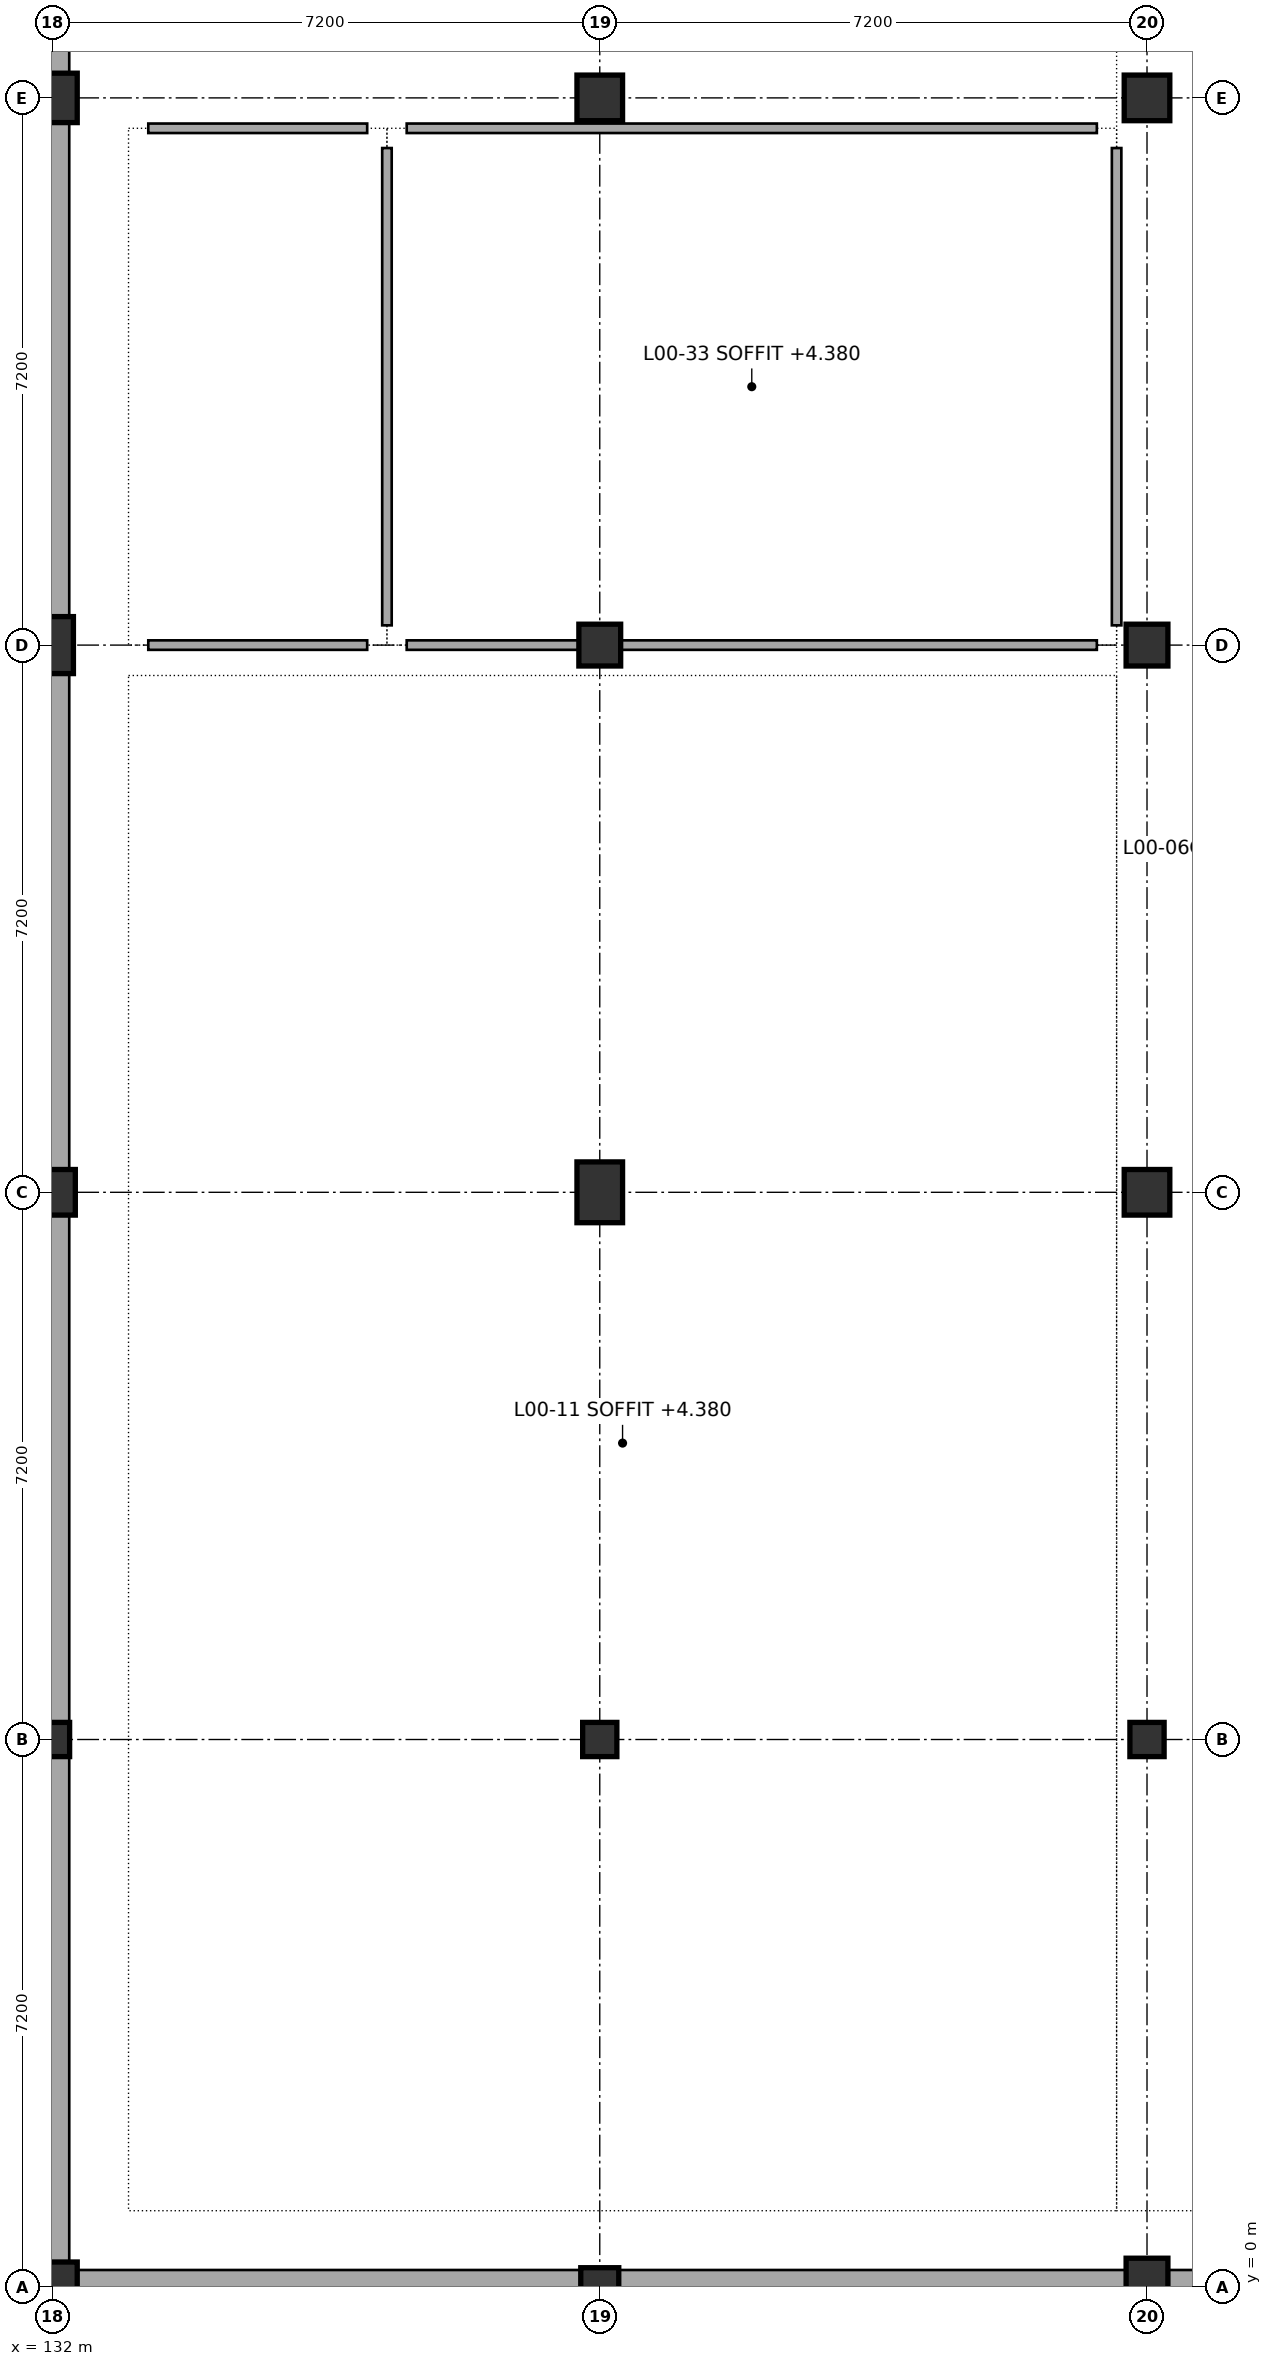
"""IFC4 building model, lengths in metres.
Left out: names, types, materials, properties, quantities, classifications, styles, units other than length and angle.
Written with IfcOpenShell. Run it as: python <this file> out.ifc"""

import sys

from ifc_helpers import new_model, si_unit, direction, frame, frame_2d, origin, origin_2d, place, context, subcontext, project, spatial, rectangle, circle, extrude, element, fill, save


model = new_model("IFC4")
c1 = context("Model", 3, precision=1e-05, world=origin(), true_north=direction((0.0, 1.0)))
c2 = subcontext(c1, "Body", "Model", "MODEL_VIEW")
j1 = project(units=[si_unit("LENGTHUNIT", "METRE"), si_unit("PLANEANGLEUNIT", "RADIAN")], contexts=[c1])
p1 = place(None, origin())
s1 = spatial("IfcSite", under=j1, at=p1, CompositionType="ELEMENT")
p2 = place(p1, origin())
s2 = spatial("IfcBuilding", under=s1, at=p2, CompositionType="ELEMENT")
p3 = place(p2, origin())
s3 = spatial("IfcBuildingStorey", under=s2, at=p3, CompositionType="ELEMENT", Elevation=0.0)
p4 = place(p3, frame((132.0, 0.0, 0.0), z_axis=(0.0, 0.0, 1.0), x_axis=(1.0, 0.0, 0.0)))
e1 = element("IfcColumn", 1, at=p4, inside=s3, PredefinedType="COLUMN", context=c2, shape_type="SweptSolid", body=[
    extrude(circle(Radius=0.325, at=origin_2d()), origin(), (0.0, 0.0, 1.0), 4.8),
])
p5 = place(p3, frame((132.0, 7.2, 0.0), z_axis=(0.0, 0.0, 1.0), x_axis=(1.0, 0.0, 0.0)))
e2 = element("IfcColumn", 2, at=p5, inside=s3, PredefinedType="COLUMN", context=c2, shape_type="SweptSolid", body=[
    extrude(rectangle(XDim=0.45, YDim=0.45, at=origin_2d()), origin(), (0.0, 0.0, 1.0), 4.8),
])
p6 = place(p3, frame((132.0, 14.4, 0.0), z_axis=(0.0, 0.0, 1.0), x_axis=(1.0, 0.0, 0.0)))
e3 = element("IfcColumn", 3, at=p6, inside=s3, PredefinedType="COLUMN", context=c2, shape_type="SweptSolid", body=[
    extrude(rectangle(XDim=0.6, YDim=0.6, at=origin_2d()), origin(), (0.0, 0.0, 1.0), 4.8),
])
p7 = place(p3, frame((132.0, 21.6, 0.0), z_axis=(0.0, 0.0, 1.0), x_axis=(1.0, 0.0, 0.0)))
e4 = element("IfcColumn", 4, at=p7, inside=s3, PredefinedType="COLUMN", context=c2, shape_type="SweptSolid", body=[
    extrude(rectangle(XDim=0.55, YDim=0.75, at=origin_2d()), origin(), (0.0, 0.0, 1.0), 4.8),
])
p8 = place(p3, frame((132.0, 28.8, 0.0), z_axis=(0.0, 0.0, 1.0), x_axis=(1.0, 0.0, 0.0)))
e5 = element("IfcColumn", 5, at=p8, inside=s3, PredefinedType="COLUMN", context=c2, shape_type="SweptSolid", body=[
    extrude(circle(Radius=0.325, at=origin_2d()), origin(), (0.0, 0.0, 1.0), 4.8),
])
p9 = place(p3, frame((139.2, 0.0, 0.0), z_axis=(0.0, 0.0, 1.0), x_axis=(1.0, 0.0, 0.0)))
e6 = element("IfcColumn", 6, at=p9, inside=s3, PredefinedType="COLUMN", context=c2, shape_type="SweptSolid", body=[
    extrude(rectangle(XDim=0.5, YDim=0.5, at=origin_2d()), origin(), (0.0, 0.0, 1.0), 4.8),
])
p10 = place(p3, frame((139.2, 7.2, 0.0), z_axis=(0.0, 0.0, 1.0), x_axis=(1.0, 0.0, 0.0)))
e7 = element("IfcColumn", 7, at=p10, inside=s3, PredefinedType="COLUMN", context=c2, shape_type="SweptSolid", body=[
    extrude(rectangle(XDim=0.45, YDim=0.45, at=origin_2d()), origin(), (0.0, 0.0, 1.0), 4.8),
])
p11 = place(p3, frame((139.2, 14.4, 0.0), z_axis=(0.0, 0.0, 1.0), x_axis=(1.0, 0.0, 0.0)))
e8 = element("IfcColumn", 8, at=p11, inside=s3, PredefinedType="COLUMN", context=c2, shape_type="SweptSolid", body=[
    extrude(rectangle(XDim=0.6, YDim=0.8, at=origin_2d()), origin(), (0.0, 0.0, 1.0), 4.8),
])
p12 = place(p3, frame((139.2, 21.6, 0.0), z_axis=(0.0, 0.0, 1.0), x_axis=(1.0, 0.0, 0.0)))
e9 = element("IfcColumn", 9, at=p12, inside=s3, PredefinedType="COLUMN", context=c2, shape_type="SweptSolid", body=[
    extrude(rectangle(XDim=0.55, YDim=0.55, at=origin_2d()), origin(), (0.0, 0.0, 1.0), 4.8),
])
p13 = place(p3, frame((139.2, 28.8, 0.0), z_axis=(0.0, 0.0, 1.0), x_axis=(1.0, 0.0, 0.0)))
e10 = element("IfcColumn", 10, at=p13, inside=s3, PredefinedType="COLUMN", context=c2, shape_type="SweptSolid", body=[
    extrude(rectangle(XDim=0.6, YDim=0.6, at=origin_2d()), origin(), (0.0, 0.0, 1.0), 4.8),
])
p14 = place(p3, frame((146.4, 0.0, 0.0), z_axis=(0.0, 0.0, 1.0), x_axis=(1.0, 0.0, 0.0)))
e11 = element("IfcColumn", 11, at=p14, inside=s3, PredefinedType="COLUMN", context=c2, shape_type="SweptSolid", body=[
    extrude(rectangle(XDim=0.55, YDim=0.75, at=origin_2d()), origin(), (0.0, 0.0, 1.0), 4.8),
])
p15 = place(p3, frame((146.4, 7.2, 0.0), z_axis=(0.0, 0.0, 1.0), x_axis=(1.0, 0.0, 0.0)))
e12 = element("IfcColumn", 12, at=p15, inside=s3, PredefinedType="COLUMN", context=c2, shape_type="SweptSolid", body=[
    extrude(rectangle(XDim=0.45, YDim=0.45, at=origin_2d()), origin(), (0.0, 0.0, 1.0), 4.8),
])
p16 = place(p3, frame((146.4, 14.4, 0.0), z_axis=(0.0, 0.0, 1.0), x_axis=(1.0, 0.0, 0.0)))
e13 = element("IfcColumn", 13, at=p16, inside=s3, PredefinedType="COLUMN", context=c2, shape_type="SweptSolid", body=[
    extrude(rectangle(XDim=0.6, YDim=0.6, at=origin_2d()), origin(), (0.0, 0.0, 1.0), 4.8),
])
p17 = place(p3, frame((146.4, 21.6, 0.0), z_axis=(0.0, 0.0, 1.0), x_axis=(1.0, 0.0, 0.0)))
e14 = element("IfcColumn", 14, at=p17, inside=s3, PredefinedType="COLUMN", context=c2, shape_type="SweptSolid", body=[
    extrude(rectangle(XDim=0.55, YDim=0.55, at=origin_2d()), origin(), (0.0, 0.0, 1.0), 4.8),
])
p18 = place(p3, frame((146.4, 28.8, 0.0), z_axis=(0.0, 0.0, 1.0), x_axis=(1.0, 0.0, 0.0)))
e15 = element("IfcColumn", 15, at=p18, inside=s3, PredefinedType="COLUMN", context=c2, shape_type="SweptSolid", body=[
    extrude(rectangle(XDim=0.6, YDim=0.6, at=origin_2d()), origin(), (0.0, 0.0, 1.0), 4.8),
])
p19 = place(p3, frame((153.6, 0.0, 0.0), z_axis=(0.0, 0.0, 1.0), x_axis=(-1.0, 0.0, 0.0)))
e16 = element("IfcWall", 16, at=p19, inside=s3, PredefinedType="STANDARD", context=c2, shape_type="SweptSolid", body=[
    extrude(rectangle(XDim=7.2, YDim=0.44, at=frame_2d((3.6, 0.0))), origin(), (0.0, 0.0, 1.0), 4.44),
])
p20 = place(p19, frame((2.7, 0.0, 0.8)))
e17 = element("IfcOpeningElement", 17, at=p20, cuts=e16, PredefinedType="OPENING", context=c2, shape_type="SweptSolid", body=[
    extrude(rectangle(XDim=1.8, YDim=1.65, at=frame_2d((0.9, 0.825))), frame((0.0, 0.23, 0.0), z_axis=(0.0, -1.0, 0.0), x_axis=(1.0, 0.0, 0.0)), (0.0, 0.0, 1.0), 0.46),
])
p21 = place(p3, frame((146.4, 0.0, 0.0), z_axis=(0.0, 0.0, 1.0), x_axis=(-1.0, 0.0, 0.0)))
e18 = element("IfcWall", 18, at=p21, inside=s3, PredefinedType="STANDARD", context=c2, shape_type="SweptSolid", body=[
    extrude(rectangle(XDim=7.2, YDim=0.44, at=frame_2d((3.6, 0.0))), origin(), (0.0, 0.0, 1.0), 4.44),
])
p22 = place(p21, frame((2.9, 0.0, 0.8)))
e19 = element("IfcOpeningElement", 19, at=p22, cuts=e18, PredefinedType="OPENING", context=c2, shape_type="SweptSolid", body=[
    extrude(rectangle(XDim=1.4, YDim=2.05, at=frame_2d((0.7, 1.025))), frame((0.0, 0.23, 0.0), z_axis=(0.0, -1.0, 0.0), x_axis=(1.0, 0.0, 0.0)), (0.0, 0.0, 1.0), 0.46),
])
p23 = place(p3, frame((139.2, 0.0, 0.0), z_axis=(0.0, 0.0, 1.0), x_axis=(-1.0, 0.0, 0.0)))
e20 = element("IfcWall", 20, at=p23, inside=s3, PredefinedType="STANDARD", context=c2, shape_type="SweptSolid", body=[
    extrude(rectangle(XDim=7.2, YDim=0.44, at=frame_2d((3.6, 0.0))), origin(), (0.0, 0.0, 1.0), 4.44),
])
p24 = place(p23, frame((2.7, 0.0, 0.8)))
e21 = element("IfcOpeningElement", 21, at=p24, cuts=e20, PredefinedType="OPENING", context=c2, shape_type="SweptSolid", body=[
    extrude(rectangle(XDim=1.8, YDim=2.05, at=frame_2d((0.9, 1.025))), frame((0.0, 0.23, 0.0), z_axis=(0.0, -1.0, 0.0), x_axis=(1.0, 0.0, 0.0)), (0.0, 0.0, 1.0), 0.46),
])
p25 = place(p3, frame((132.0, 0.0, 0.0), z_axis=(0.0, 0.0, 1.0), x_axis=(0.0, 1.0, 0.0)))
e22 = element("IfcWall", 22, at=p25, inside=s3, PredefinedType="STANDARD", context=c2, shape_type="SweptSolid", body=[
    extrude(rectangle(XDim=7.2, YDim=0.44, at=frame_2d((3.6, 0.0))), origin(), (0.0, 0.0, 1.0), 4.44),
])
p26 = place(p25, frame((2.5, 0.0, 0.8)))
e23 = element("IfcOpeningElement", 23, at=p26, cuts=e22, PredefinedType="OPENING", context=c2, shape_type="SweptSolid", body=[
    extrude(rectangle(XDim=2.2, YDim=2.05, at=frame_2d((1.1, 1.025))), frame((0.0, 0.23, 0.0), z_axis=(0.0, -1.0, 0.0), x_axis=(1.0, 0.0, 0.0)), (0.0, 0.0, 1.0), 0.46),
])
p27 = place(p3, frame((132.0, 7.2, 0.0), z_axis=(0.0, 0.0, 1.0), x_axis=(0.0, 1.0, 0.0)))
e24 = element("IfcWall", 24, at=p27, inside=s3, PredefinedType="STANDARD", context=c2, shape_type="SweptSolid", body=[
    extrude(rectangle(XDim=7.2, YDim=0.44, at=frame_2d((3.6, 0.0))), origin(), (0.0, 0.0, 1.0), 4.44),
])
p28 = place(p27, frame((3.0, 0.0, 0.8)))
e25 = element("IfcOpeningElement", 25, at=p28, cuts=e24, PredefinedType="OPENING", context=c2, shape_type="SweptSolid", body=[
    extrude(rectangle(XDim=1.2, YDim=1.65, at=frame_2d((0.6, 0.825))), frame((0.0, 0.23, 0.0), z_axis=(0.0, -1.0, 0.0), x_axis=(1.0, 0.0, 0.0)), (0.0, 0.0, 1.0), 0.46),
])
p29 = place(p3, frame((132.0, 14.4, 0.0), z_axis=(0.0, 0.0, 1.0), x_axis=(0.0, 1.0, 0.0)))
e26 = element("IfcWall", 26, at=p29, inside=s3, PredefinedType="STANDARD", context=c2, shape_type="SweptSolid", body=[
    extrude(rectangle(XDim=7.2, YDim=0.44, at=frame_2d((3.6, 0.0))), origin(), (0.0, 0.0, 1.0), 4.44),
])
p30 = place(p29, frame((2.85, 0.0, 0.8)))
e27 = element("IfcOpeningElement", 27, at=p30, cuts=e26, PredefinedType="OPENING", context=c2, shape_type="SweptSolid", body=[
    extrude(rectangle(XDim=1.5, YDim=1.65, at=frame_2d((0.75, 0.825))), frame((0.0, 0.23, 0.0), z_axis=(0.0, -1.0, 0.0), x_axis=(1.0, 0.0, 0.0)), (0.0, 0.0, 1.0), 0.46),
])
p31 = place(p3, frame((132.0, 21.6, 0.0), z_axis=(0.0, 0.0, 1.0), x_axis=(0.0, 1.0, 0.0)))
e28 = element("IfcWall", 28, at=p31, inside=s3, PredefinedType="STANDARD", context=c2, shape_type="SweptSolid", body=[
    extrude(rectangle(XDim=7.2, YDim=0.44, at=frame_2d((3.6, 0.0))), origin(), (0.0, 0.0, 1.0), 4.44),
])
p32 = place(p31, frame((2.7, 0.0, 0.8)))
e29 = element("IfcOpeningElement", 29, at=p32, cuts=e28, PredefinedType="OPENING", context=c2, shape_type="SweptSolid", body=[
    extrude(rectangle(XDim=1.8, YDim=1.65, at=frame_2d((0.9, 0.825))), frame((0.0, 0.23, 0.0), z_axis=(0.0, -1.0, 0.0), x_axis=(1.0, 0.0, 0.0)), (0.0, 0.0, 1.0), 0.46),
])
p33 = place(p3, frame((132.0, 28.8, 0.0), z_axis=(0.0, 0.0, 1.0), x_axis=(0.0, 1.0, 0.0)))
e30 = element("IfcWall", 30, at=p33, inside=s3, PredefinedType="STANDARD", context=c2, shape_type="SweptSolid", body=[
    extrude(rectangle(XDim=7.2, YDim=0.44, at=frame_2d((3.6, 0.0))), origin(), (0.0, 0.0, 1.0), 4.44),
])
p34 = place(p33, frame((2.9, 0.0, 0.8)))
e31 = element("IfcOpeningElement", 31, at=p34, cuts=e30, PredefinedType="OPENING", context=c2, shape_type="SweptSolid", body=[
    extrude(rectangle(XDim=1.4, YDim=2.05, at=frame_2d((0.7, 1.025))), frame((0.0, 0.23, 0.0), z_axis=(0.0, -1.0, 0.0), x_axis=(1.0, 0.0, 0.0)), (0.0, 0.0, 1.0), 0.46),
])
p35 = place(p3, frame((136.66, 21.6, 0.0), z_axis=(0.0, 0.0, 1.0), x_axis=(1.0, 0.0, 0.0)))
e32 = element("IfcWall", 32, at=p35, inside=s3, PredefinedType="PARTITIONING", context=c2, shape_type="SweptSolid", body=[
    extrude(rectangle(XDim=9.08, YDim=0.125, at=frame_2d((4.54, 0.0))), origin(), (0.0, 0.0, 1.0), 3.665),
])
p36 = place(p3, frame((146.0, 21.86, 0.0), z_axis=(0.0, 0.0, 1.0), x_axis=(0.0, 1.0, 0.0)))
e33 = element("IfcWall", 33, at=p36, inside=s3, PredefinedType="PARTITIONING", context=c2, shape_type="SweptSolid", body=[
    extrude(rectangle(XDim=6.28, YDim=0.125, at=frame_2d((3.14, 0.0))), origin(), (0.0, 0.0, 1.0), 3.615),
])
p37 = place(p36, frame((2.67, 0.0, 0.0)))
e34 = element("IfcOpeningElement", 34, at=p37, cuts=e33, PredefinedType="OPENING", context=c2, shape_type="SweptSolid", body=[
    extrude(rectangle(XDim=0.94, YDim=2.1, at=frame_2d((0.47, 1.05))), frame((0.0, 0.073, 0.0), z_axis=(0.0, -1.0, 0.0), x_axis=(1.0, 0.0, 0.0)), (0.0, 0.0, 1.0), 0.145),
])
p38 = place(p3, frame((145.74, 28.4, 0.0), z_axis=(0.0, 0.0, 1.0), x_axis=(-1.0, 0.0, 0.0)))
e35 = element("IfcWall", 35, at=p38, inside=s3, PredefinedType="PARTITIONING", context=c2, shape_type="SweptSolid", body=[
    extrude(rectangle(XDim=9.08, YDim=0.125, at=frame_2d((4.54, 0.0))), origin(), (0.0, 0.0, 1.0), 3.665),
])
p39 = place(p3, frame((136.4, 28.14, 0.0), z_axis=(0.0, 0.0, 1.0), x_axis=(0.0, -1.0, 0.0)))
e36 = element("IfcWall", 36, at=p39, inside=s3, PredefinedType="PARTITIONING", context=c2, shape_type="SweptSolid", body=[
    extrude(rectangle(XDim=6.28, YDim=0.125, at=frame_2d((3.14, 0.0))), origin(), (0.0, 0.0, 1.0), 4.44),
])
p40 = place(p3, frame((133.26, 21.6, 0.0), z_axis=(0.0, 0.0, 1.0), x_axis=(1.0, 0.0, 0.0)))
e37 = element("IfcWall", 37, at=p40, inside=s3, PredefinedType="PARTITIONING", context=c2, shape_type="SweptSolid", body=[
    extrude(rectangle(XDim=2.88, YDim=0.125, at=frame_2d((1.44, 0.0))), origin(), (0.0, 0.0, 1.0), 3.715),
])
p41 = place(p3, frame((136.14, 28.4, 0.0), z_axis=(0.0, 0.0, 1.0), x_axis=(-1.0, 0.0, 0.0)))
e38 = element("IfcWall", 38, at=p41, inside=s3, PredefinedType="PARTITIONING", context=c2, shape_type="SweptSolid", body=[
    extrude(rectangle(XDim=2.88, YDim=0.125, at=frame_2d((1.44, 0.0))), origin(), (0.0, 0.0, 1.0), 3.665),
])
p42 = place(p41, frame((0.97, 0.0, 0.0)))
e39 = element("IfcOpeningElement", 39, at=p42, cuts=e38, PredefinedType="OPENING", context=c2, shape_type="SweptSolid", body=[
    extrude(rectangle(XDim=0.94, YDim=2.1, at=frame_2d((0.47, 1.05))), frame((0.0, 0.073, 0.0), z_axis=(0.0, -1.0, 0.0), x_axis=(1.0, 0.0, 0.0)), (0.0, 0.0, 1.0), 0.145),
])
p43 = place(p22, origin())
e40 = element("IfcWindow", 40, at=p43, inside=s3, PartitioningType="SINGLE_PANEL", PredefinedType="WINDOW", context=c2, shape_type="SweptSolid", body=[
    extrude(rectangle(XDim=1.4, YDim=2.05, at=frame_2d((0.7, 1.025))), frame((0.0, 0.03, 0.0), z_axis=(0.0, -1.0, 0.0), x_axis=(1.0, 0.0, 0.0)), (0.0, 0.0, 1.0), 0.06),
])
fill(e19, e40)
p44 = place(p24, origin())
e41 = element("IfcWindow", 41, at=p44, inside=s3, PartitioningType="SINGLE_PANEL", PredefinedType="WINDOW", context=c2, shape_type="SweptSolid", body=[
    extrude(rectangle(XDim=1.8, YDim=2.05, at=frame_2d((0.9, 1.025))), frame((0.0, 0.03, 0.0), z_axis=(0.0, -1.0, 0.0), x_axis=(1.0, 0.0, 0.0)), (0.0, 0.0, 1.0), 0.06),
])
fill(e21, e41)
p45 = place(p26, origin())
e42 = element("IfcWindow", 42, at=p45, inside=s3, PartitioningType="SINGLE_PANEL", PredefinedType="WINDOW", context=c2, shape_type="SweptSolid", body=[
    extrude(rectangle(XDim=2.2, YDim=2.05, at=frame_2d((1.1, 1.025))), frame((0.0, 0.03, 0.0), z_axis=(0.0, -1.0, 0.0), x_axis=(1.0, 0.0, 0.0)), (0.0, 0.0, 1.0), 0.06),
])
fill(e23, e42)
p46 = place(p28, origin())
e43 = element("IfcWindow", 43, at=p46, inside=s3, PartitioningType="SINGLE_PANEL", PredefinedType="WINDOW", context=c2, shape_type="SweptSolid", body=[
    extrude(rectangle(XDim=1.2, YDim=1.65, at=frame_2d((0.6, 0.825))), frame((0.0, 0.03, 0.0), z_axis=(0.0, -1.0, 0.0), x_axis=(1.0, 0.0, 0.0)), (0.0, 0.0, 1.0), 0.06),
])
fill(e25, e43)
p47 = place(p30, origin())
e44 = element("IfcWindow", 44, at=p47, inside=s3, PartitioningType="SINGLE_PANEL", PredefinedType="WINDOW", context=c2, shape_type="SweptSolid", body=[
    extrude(rectangle(XDim=1.5, YDim=1.65, at=frame_2d((0.75, 0.825))), frame((0.0, 0.03, 0.0), z_axis=(0.0, -1.0, 0.0), x_axis=(1.0, 0.0, 0.0)), (0.0, 0.0, 1.0), 0.06),
])
fill(e27, e44)
p48 = place(p32, origin())
e45 = element("IfcWindow", 45, at=p48, inside=s3, PartitioningType="SINGLE_PANEL", PredefinedType="WINDOW", context=c2, shape_type="SweptSolid", body=[
    extrude(rectangle(XDim=1.8, YDim=1.65, at=frame_2d((0.9, 0.825))), frame((0.0, 0.03, 0.0), z_axis=(0.0, -1.0, 0.0), x_axis=(1.0, 0.0, 0.0)), (0.0, 0.0, 1.0), 0.06),
])
fill(e29, e45)
p49 = place(p37, origin())
e46 = element("IfcDoor", 46, at=p49, inside=s3, OperationType="SINGLE_SWING_LEFT", PredefinedType="DOOR", context=c2, shape_type="SweptSolid", body=[
    extrude(rectangle(XDim=0.94, YDim=2.1, at=frame_2d((0.47, 1.05))), frame((0.0, 0.025, 0.0), z_axis=(0.0, -1.0, 0.0), x_axis=(1.0, 0.0, 0.0)), (0.0, 0.0, 1.0), 0.05),
])
fill(e34, e46)
p50 = place(p42, origin())
e47 = element("IfcDoor", 47, at=p50, inside=s3, OperationType="SINGLE_SWING_RIGHT", PredefinedType="DOOR", context=c2, shape_type="SweptSolid", body=[
    extrude(rectangle(XDim=0.94, YDim=2.1, at=frame_2d((0.47, 1.05))), frame((0.0, 0.025, 0.0), z_axis=(0.0, -1.0, 0.0), x_axis=(1.0, 0.0, 0.0)), (0.0, 0.0, 1.0), 0.05),
])
fill(e39, e47)
save(model, sys.argv[1])
